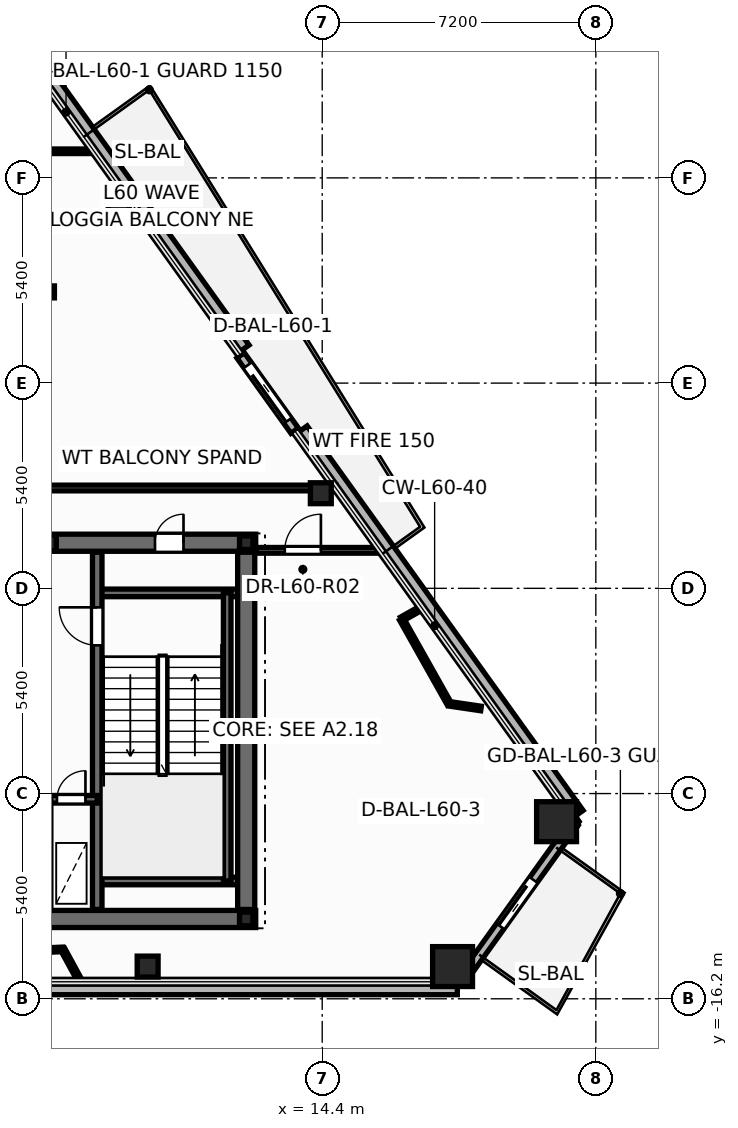
"""IFC4 building model, lengths in metres.
Left out: names, types, materials, properties, quantities, classifications, styles, units other than length and angle.
Written with IfcOpenShell. Run it as: python <this file> out.ifc"""

import sys

from ifc_helpers import new_model, si_unit, direction, frame, frame_2d, origin, origin_2d, place, context, subcontext, project, spatial, rectangle, hollow_rectangle, hollow_circle, i_section, extrude, element, fill, save


model = new_model("IFC4")
c1 = context("Model", 3, precision=1e-05, world=origin(), true_north=direction((0.0, 1.0)))
c2 = subcontext(c1, "Body", "Model", "MODEL_VIEW")
j1 = project(units=[si_unit("LENGTHUNIT", "METRE"), si_unit("PLANEANGLEUNIT", "RADIAN")], contexts=[c1])
p1 = place(None, origin())
s1 = spatial("IfcSite", under=j1, at=p1, CompositionType="ELEMENT")
p2 = place(p1, origin())
s2 = spatial("IfcBuilding", under=s1, at=p2, CompositionType="ELEMENT")
p3 = place(p2, frame((0.0, 0.0, 228.9)))
s3 = spatial("IfcBuildingStorey", under=s2, at=p3, CompositionType="ELEMENT", Elevation=228.9)
for number, where, z_axis, x_axis in (
    (1, (17.83, -15.352, 0.0), (0.0, 0.0, 1.0), (1.0, 0.0, 0.0)),
    (2, (20.567, -11.54, 0.0), (0.0, 0.0, 1.0), (1.0, 0.0, 0.0)),
):
    element("IfcColumn", number, at=place(p3, frame(where, z_axis=z_axis, x_axis=x_axis)), inside=s3, PredefinedType="COLUMN", context=c2, shape_type="SweptSolid", body=[
        extrude(hollow_rectangle(XDim=1.05, YDim=1.05, WallThickness=0.045, at=origin_2d()), origin(), (0.0, 0.0, 1.0), 4.5),
    ])
for number, where, z_axis, x_axis in (
    (3, (9.807, -15.352, 0.0), (0.0, 0.0, 1.0), (1.0, 0.0, 0.0)),
    (4, (14.363, -2.897, 0.0), (0.0, 0.0, 1.0), (1.0, 0.0, 0.0)),
    (5, (9.046, 4.51, 0.0), (0.0, 0.0, 1.0), (1.0, 0.0, 0.0)),
):
    element("IfcColumn", number, at=place(p3, frame(where, z_axis=z_axis, x_axis=x_axis)), inside=s3, PredefinedType="COLUMN", context=c2, shape_type="SweptSolid", body=[
        extrude(hollow_circle(Radius=0.275, WallThickness=0.024, at=origin_2d()), origin(), (0.0, 0.0, 1.0), 4.5),
    ])
for number, where, z_axis, x_axis in (
    (6, (12.4, -14.1, 0.0), (0.0, 0.0, 1.0), (1.0, 0.0, 0.0)),
    (7, (12.4, -4.2, 0.0), (0.0, 0.0, 1.0), (1.0, 0.0, 0.0)),
):
    element("IfcColumn", number, at=place(p3, frame(where, z_axis=z_axis, x_axis=x_axis)), inside=s3, PredefinedType="COLUMN", context=c2, shape_type="SweptSolid", body=[
        extrude(i_section(OverallWidth=0.352, OverallDepth=0.359, WebThickness=0.018, FlangeThickness=0.026, at=origin_2d()), origin(), (0.0, 0.0, 1.0), 4.5),
    ])
p4 = place(p3, frame((7.2, -4.2, 0.0), z_axis=(0.0, 0.0, 1.0), x_axis=(1.0, 0.0, 0.0)))
e8 = element("IfcColumn", 8, at=p4, inside=s3, PredefinedType="PILASTER", context=c2, shape_type="SweptSolid", body=[
    extrude(i_section(OverallWidth=0.405, OverallDepth=0.414, WebThickness=0.022, FlangeThickness=0.032, at=origin_2d()), origin(), (0.0, 0.0, 1.0), 4.5),
])
p5 = place(p3, frame((7.2, 2.4, 0.0), z_axis=(0.0, 0.0, 1.0), x_axis=(1.0, 0.0, 0.0)))
e9 = element("IfcColumn", 9, at=p5, inside=s3, PredefinedType="COLUMN", context=c2, shape_type="SweptSolid", body=[
    extrude(i_section(OverallWidth=0.307, OverallDepth=0.314, WebThickness=0.012, FlangeThickness=0.019, at=origin_2d()), origin(), (0.0, 0.0, 1.0), 4.5),
])
p6 = place(p3, frame((-17.955, -15.912, -0.2), z_axis=(0.0, 0.0, 1.0), x_axis=(1.0, 0.0, 0.0)))
e10 = element("IfcWall", 10, at=p6, inside=s3, PredefinedType="PARAPET", context=c2, shape_type="SweptSolid", body=[
    extrude(rectangle(XDim=35.911, YDim=0.36, at=frame_2d((17.955, 0.0))), origin(), (0.0, 0.0, 1.0), 0.38),
])
p7 = place(p3, frame((21.119, -11.349, -0.2), z_axis=(0.0, 0.0, 1.0), x_axis=(-0.583115229509, 0.81238945655, 0.0)))
e11 = element("IfcWall", 11, at=p7, inside=s3, PredefinedType="PARAPET", context=c2, shape_type="SweptSolid", body=[
    extrude(rectangle(XDim=12.453, YDim=0.36, at=frame_2d((6.227, 0.0))), origin(), (0.0, 0.0, 1.0), 0.38),
])
p8 = place(p3, frame((12.33, 0.896, -0.2), z_axis=(0.0, 0.0, 1.0), x_axis=(-0.583103601817, 0.812397802526, 0.0)))
e12 = element("IfcWall", 12, at=p8, inside=s3, PredefinedType="PARAPET", context=c2, shape_type="SweptSolid", body=[
    extrude(rectangle(XDim=15.574, YDim=0.36, at=frame_2d((7.787, 0.0))), origin(), (0.0, 0.0, 1.0), 0.38),
])
p9 = place(p3, frame((13.675, -1.252, -0.015), z_axis=(0.0, 0.0, 1.0), x_axis=(-0.583139062732, 0.812372349059, 0.0)))
e13 = element("IfcWall", 13, at=p9, inside=s3, PredefinedType="STANDARD", context=c2, shape_type="SweptSolid", body=[
    extrude(rectangle(XDim=2.44, YDim=0.24, at=frame_2d((1.22, 0.0))), origin(), (0.0, 0.0, 1.0), 3.778),
])
p10 = place(p9, frame((0.32, 0.0, 0.015)))
e14 = element("IfcOpeningElement", 14, at=p10, cuts=e13, PredefinedType="OPENING", context=c2, shape_type="SweptSolid", body=[
    extrude(rectangle(XDim=1.806, YDim=2.204, at=frame_2d((0.9, 1.102))), frame((0.0, 0.13, 0.0), z_axis=(0.0, -1.0, 0.0), x_axis=(1.0, 0.0, 0.0)), (0.0, 0.0, 1.0), 0.26),
])
p11 = place(p3, frame((18.059, -15.72, -0.015), z_axis=(0.0, 0.0, 1.0), x_axis=(0.583136392473, 0.812374265824, 0.0)))
e15 = element("IfcWall", 15, at=p11, inside=s3, PredefinedType="STANDARD", context=c2, shape_type="SweptSolid", body=[
    extrude(rectangle(XDim=5.106, YDim=0.24, at=frame_2d((2.553, 0.0))), origin(), (0.0, 0.0, 1.0), 3.778),
])
p12 = place(p11, frame((1.759, 0.0, 0.015)))
e16 = element("IfcOpeningElement", 16, at=p12, cuts=e15, PredefinedType="OPENING", context=c2, shape_type="SweptSolid", body=[
    extrude(rectangle(XDim=1.506, YDim=2.204, at=frame_2d((0.75, 1.102))), frame((0.0, 0.13, 0.0), z_axis=(0.0, -1.0, 0.0), x_axis=(1.0, 0.0, 0.0)), (0.0, 0.0, 1.0), 0.26),
])
p13 = place(p3, frame((-12.65, -14.1, 0.0), z_axis=(0.0, 0.0, 1.0), x_axis=(1.0, 0.0, 0.0)))
e17 = element("IfcWall", 17, at=p13, inside=s3, PredefinedType="SHEAR", context=c2, shape_type="SweptSolid", body=[
    extrude(rectangle(XDim=25.3, YDim=0.45, at=frame_2d((12.65, 0.0))), origin(), (0.0, 0.0, 1.0), 4.5),
])
p14 = place(p3, frame((-12.65, -4.2, 0.0), z_axis=(0.0, 0.0, 1.0), x_axis=(1.0, 0.0, 0.0)))
e18 = element("IfcWall", 18, at=p14, inside=s3, PredefinedType="SHEAR", context=c2, shape_type="SweptSolid", body=[
    extrude(rectangle(XDim=25.3, YDim=0.45, at=frame_2d((12.65, 0.0))), origin(), (0.0, 0.0, 1.0), 4.5),
])
p15 = place(p14, frame((1.85, 0.0, 0.0)))
e19 = element("IfcOpeningElement", 19, at=p15, cuts=e18, PredefinedType="OPENING", context=c2, shape_type="SweptSolid", body=[
    extrude(rectangle(XDim=0.756, YDim=2.054, at=frame_2d((0.375, 1.027))), frame((0.0, 0.235, 0.0), z_axis=(0.0, -1.0, 0.0), x_axis=(1.0, 0.0, 0.0)), (0.0, 0.0, 1.0), 0.47),
])
p16 = place(p14, frame((22.65, 0.0, 0.0)))
e20 = element("IfcOpeningElement", 20, at=p16, cuts=e18, PredefinedType="OPENING", context=c2, shape_type="SweptSolid", body=[
    extrude(rectangle(XDim=0.756, YDim=2.054, at=frame_2d((0.375, 1.027))), frame((0.0, 0.235, 0.0), z_axis=(0.0, -1.0, 0.0), x_axis=(1.0, 0.0, 0.0)), (0.0, 0.0, 1.0), 0.47),
])
p17 = place(p14, frame((5.85, 0.0, 0.0)))
e21 = element("IfcOpeningElement", 21, at=p17, cuts=e18, PredefinedType="OPENING", context=c2, shape_type="SweptSolid", body=[
    extrude(rectangle(XDim=1.006, YDim=2.104, at=frame_2d((0.5, 1.052))), frame((0.0, 0.235, 0.0), z_axis=(0.0, -1.0, 0.0), x_axis=(1.0, 0.0, 0.0)), (0.0, 0.0, 1.0), 0.47),
])
p18 = place(p14, frame((10.35, 0.0, 0.0)))
e22 = element("IfcOpeningElement", 22, at=p18, cuts=e18, PredefinedType="OPENING", context=c2, shape_type="SweptSolid", body=[
    extrude(rectangle(XDim=1.406, YDim=2.154, at=frame_2d((0.7, 1.077))), frame((0.0, 0.235, 0.0), z_axis=(0.0, -1.0, 0.0), x_axis=(1.0, 0.0, 0.0)), (0.0, 0.0, 1.0), 0.47),
])
p19 = place(p14, frame((18.45, 0.0, 0.0)))
e23 = element("IfcOpeningElement", 23, at=p19, cuts=e18, PredefinedType="OPENING", context=c2, shape_type="SweptSolid", body=[
    extrude(rectangle(XDim=1.006, YDim=2.104, at=frame_2d((0.5, 1.052))), frame((0.0, 0.235, 0.0), z_axis=(0.0, -1.0, 0.0), x_axis=(1.0, 0.0, 0.0)), (0.0, 0.0, 1.0), 0.47),
])
for number, where, z_axis, x_axis in (
    (24, (8.48, -5.52, 0.0), (0.0, 0.0, 1.0), (1.0, 0.0, 0.0)),
    (25, (8.48, -13.1, 0.0), (0.0, 0.0, 1.0), (1.0, 0.0, 0.0)),
):
    element("IfcWall", number, at=place(p3, frame(where, z_axis=z_axis, x_axis=x_axis)), inside=s3, PredefinedType="SOLIDWALL", context=c2, shape_type="SweptSolid", body=[
        extrude(rectangle(XDim=3.87, YDim=0.2, at=frame_2d((1.935, 0.0))), origin(), (0.0, 0.0, 1.0), 4.5),
    ])
p20 = place(p3, frame((11.9, -13.1, 0.0), z_axis=(0.0, 0.0, 1.0), x_axis=(0.0, 1.0, 0.0)))
e26 = element("IfcWall", 26, at=p20, inside=s3, PredefinedType="SOLIDWALL", context=c2, shape_type="SweptSolid", body=[
    extrude(rectangle(XDim=7.58, YDim=0.2, at=frame_2d((3.79, 0.0))), origin(), (0.0, 0.0, 1.0), 4.5),
])
p21 = place(p3, frame((8.48, -13.85, 0.0), z_axis=(0.0, 0.0, 1.0), x_axis=(0.0, 1.0, 0.0)))
e27 = element("IfcWall", 27, at=p21, inside=s3, PredefinedType="SHEAR", context=c2, shape_type="SweptSolid", body=[
    extrude(rectangle(XDim=9.4, YDim=0.25, at=frame_2d((4.7, 0.0))), origin(), (0.0, 0.0, 1.0), 4.5),
])
p22 = place(p21, frame((6.95, 0.0, 0.0)))
e28 = element("IfcOpeningElement", 28, at=p22, cuts=e27, PredefinedType="OPENING", context=c2, shape_type="SweptSolid", body=[
    extrude(rectangle(XDim=1.006, YDim=2.104, at=frame_2d((0.5, 1.052))), frame((0.0, 0.135, 0.0), z_axis=(0.0, -1.0, 0.0), x_axis=(1.0, 0.0, 0.0)), (0.0, 0.0, 1.0), 0.27),
])
p23 = place(p3, frame((5.12, -10.95, 0.0), z_axis=(0.0, 0.0, 1.0), x_axis=(1.0, 0.0, 0.0)))
e29 = element("IfcWall", 29, at=p23, inside=s3, PredefinedType="SOLIDWALL", context=c2, shape_type="SweptSolid", body=[
    extrude(rectangle(XDim=3.36, YDim=0.2, at=frame_2d((1.68, 0.0))), origin(), (0.0, 0.0, 1.0), 4.5),
])
p24 = place(p23, frame((0.42, 0.0, 0.0)))
e30 = element("IfcOpeningElement", 30, at=p24, cuts=e29, PredefinedType="OPENING", context=c2, shape_type="SweptSolid", body=[
    extrude(rectangle(XDim=1.106, YDim=2.104, at=frame_2d((0.55, 1.052))), frame((0.0, 0.11, 0.0), z_axis=(0.0, -1.0, 0.0), x_axis=(1.0, 0.0, 0.0)), (0.0, 0.0, 1.0), 0.22),
])
p25 = place(p23, frame((2.3, 0.0, 0.0)))
e31 = element("IfcOpeningElement", 31, at=p25, cuts=e29, PredefinedType="OPENING", context=c2, shape_type="SweptSolid", body=[
    extrude(rectangle(XDim=0.756, YDim=2.054, at=frame_2d((0.375, 1.027))), frame((0.0, 0.11, 0.0), z_axis=(0.0, -1.0, 0.0), x_axis=(1.0, 0.0, 0.0)), (0.0, 0.0, 1.0), 0.22),
])
p26 = place(p3, frame((12.4, -13.85, 0.0), z_axis=(0.0, 0.0, 1.0), x_axis=(0.0, 1.0, 0.0)))
e32 = element("IfcWall", 32, at=p26, inside=s3, PredefinedType="SHEAR", context=c2, shape_type="SweptSolid", body=[
    extrude(rectangle(XDim=9.4, YDim=0.45, at=frame_2d((4.7, 0.0))), origin(), (0.0, 0.0, 1.0), 4.5),
])
p27 = place(p3, frame((2.08, -2.76, 0.0), z_axis=(0.0, 0.0, 1.0), x_axis=(1.0, 0.0, 0.0)))
e33 = element("IfcWall", 33, at=p27, inside=s3, PredefinedType="PARTITIONING", context=c2, shape_type="SweptSolid", body=[
    extrude(rectangle(XDim=12.677, YDim=0.15, at=frame_2d((6.339, 0.0))), origin(), (0.0, 0.0, 1.0), 3.22),
])
p28 = place(p27, frame((0.44, 0.0, 0.0)))
e34 = element("IfcOpeningElement", 34, at=p28, cuts=e33, PredefinedType="OPENING", context=c2, shape_type="SweptSolid", body=[
    extrude(rectangle(XDim=0.956, YDim=2.104, at=frame_2d((0.475, 1.052))), frame((0.0, 0.085, 0.0), z_axis=(0.0, -1.0, 0.0), x_axis=(1.0, 0.0, 0.0)), (0.0, 0.0, 1.0), 0.17),
])
p29 = place(p3, frame((-0.66, 6.1, 0.0), z_axis=(0.0, 0.0, 1.0), x_axis=(1.0, 0.0, 0.0)))
e35 = element("IfcWall", 35, at=p29, inside=s3, PredefinedType="PARTITIONING", context=c2, shape_type="SweptSolid", body=[
    extrude(rectangle(XDim=9.058, YDim=0.12, at=frame_2d((4.529, 0.0))), origin(), (0.0, 0.0, 1.0), 3.22),
])
p30 = place(p3, frame((3.115, -15.102, 0.0), z_axis=(0.0, 0.0, 1.0), x_axis=(0.998971020326, 0.04535306549, 0.0)))
e36 = element("IfcWall", 36, at=p30, inside=s3, PredefinedType="PARTITIONING", context=c2, shape_type="SweptSolid", body=[
    extrude(rectangle(XDim=4.463, YDim=0.12, at=frame_2d((2.231, 0.0))), origin(), (0.0, 0.0, 1.0), 4.245),
])
p31 = place(p3, frame((12.652, -4.4, 0.0), z_axis=(0.0, 0.0, 1.0), x_axis=(1.0, 0.0, 0.0)))
e37 = element("IfcWall", 37, at=p31, inside=s3, PredefinedType="PARTITIONING", context=c2, shape_type="SweptSolid", body=[
    extrude(rectangle(XDim=3.282, YDim=0.15, at=frame_2d((1.641, 0.0))), origin(), (0.0, 0.0, 1.0), 3.22),
])
p32 = place(p31, frame((0.763, 0.0, 0.0)))
e38 = element("IfcOpeningElement", 38, at=p32, cuts=e37, PredefinedType="OPENING", context=c2, shape_type="SweptSolid", body=[
    extrude(rectangle(XDim=0.956, YDim=2.104, at=frame_2d((0.475, 1.052))), frame((0.0, 0.085, 0.0), z_axis=(0.0, -1.0, 0.0), x_axis=(1.0, 0.0, 0.0)), (0.0, 0.0, 1.0), 0.17),
])
p33 = place(p3, frame((17.742, -8.439, 0.0), z_axis=(0.0, 0.0, 1.0), x_axis=(-0.490329227995, 0.87153729018, 0.0)))
e39 = element("IfcWall", 39, at=p33, inside=s3, PredefinedType="PARTITIONING", context=c2, shape_type="SweptSolid", body=[
    extrude(rectangle(XDim=2.557, YDim=0.12, at=frame_2d((1.279, 0.0))), origin(), (0.0, 0.0, 1.0), 4.245),
])
p34 = place(p3, frame((18.579, -8.562, 0.0), z_axis=(0.0, 0.0, 1.0), x_axis=(-0.989322448528, 0.145743242855, 0.0)))
e40 = element("IfcWall", 40, at=p34, inside=s3, PredefinedType="PARTITIONING", context=c2, shape_type="SweptSolid", body=[
    extrude(rectangle(XDim=0.846, YDim=0.12, at=frame_2d((0.423, 0.0))), origin(), (0.0, 0.0, 1.0), 3.763),
])
p35 = place(p3, frame((7.573, -14.899, 0.0), z_axis=(0.0, 0.0, 1.0), x_axis=(0.478546739668, -0.878062080922, 0.0)))
e41 = element("IfcWall", 41, at=p35, inside=s3, PredefinedType="PARTITIONING", context=c2, shape_type="SweptSolid", body=[
    extrude(rectangle(XDim=0.84, YDim=0.12, at=frame_2d((0.42, 0.0))), origin(), (0.0, 0.0, 1.0), 3.763),
])
p36 = place(p3, frame((16.488, -6.21, 0.0), z_axis=(0.0, 0.0, 1.0), x_axis=(0.871532028392, 0.49033858046, 0.0)))
e42 = element("IfcWall", 42, at=p36, inside=s3, PredefinedType="PARTITIONING", context=c2, shape_type="SweptSolid", body=[
    extrude(rectangle(XDim=0.599, YDim=0.12, at=frame_2d((0.3, 0.0))), origin(), (0.0, 0.0, 1.0), 3.763),
])
p37 = place(p10, origin())
e43 = element("IfcDoor", 43, at=p37, inside=s3, OperationType="SLIDING_TO_LEFT", PredefinedType="DOOR", context=c2, shape_type="SweptSolid", body=[
    extrude(rectangle(XDim=1.8, YDim=2.2, at=frame_2d((0.9, 1.1))), frame((0.0, 0.025, 0.0), z_axis=(0.0, -1.0, 0.0), x_axis=(1.0, 0.0, 0.0)), (0.0, 0.0, 1.0), 0.05),
])
fill(e14, e43)
p38 = place(p12, origin())
e44 = element("IfcDoor", 44, at=p38, inside=s3, OperationType="SLIDING_TO_RIGHT", PredefinedType="DOOR", context=c2, shape_type="SweptSolid", body=[
    extrude(rectangle(XDim=1.5, YDim=2.2, at=frame_2d((0.75, 1.1))), frame((0.0, 0.025, 0.0), z_axis=(0.0, -1.0, 0.0), x_axis=(1.0, 0.0, 0.0)), (0.0, 0.0, 1.0), 0.05),
])
fill(e16, e44)
p39 = place(p22, origin())
e45 = element("IfcDoor", 45, at=p39, inside=s3, OperationType="SINGLE_SWING_RIGHT", PredefinedType="DOOR", context=c2, shape_type="SweptSolid", body=[
    extrude(rectangle(XDim=1.0, YDim=2.1, at=frame_2d((0.5, 1.05))), frame((0.0, 0.025, 0.0), z_axis=(0.0, -1.0, 0.0), x_axis=(1.0, 0.0, 0.0)), (0.0, 0.0, 1.0), 0.05),
])
fill(e28, e45)
p40 = place(p25, origin())
e46 = element("IfcDoor", 46, at=p40, inside=s3, OperationType="SINGLE_SWING_RIGHT", PredefinedType="DOOR", context=c2, shape_type="SweptSolid", body=[
    extrude(rectangle(XDim=0.75, YDim=2.05, at=frame_2d((0.375, 1.025))), frame((0.0, 0.025, 0.0), z_axis=(0.0, -1.0, 0.0), x_axis=(1.0, 0.0, 0.0)), (0.0, 0.0, 1.0), 0.05),
])
fill(e31, e46)
p41 = place(p16, origin())
e47 = element("IfcDoor", 47, at=p41, inside=s3, OperationType="SINGLE_SWING_RIGHT", PredefinedType="DOOR", context=c2, shape_type="SweptSolid", body=[
    extrude(rectangle(XDim=0.75, YDim=2.05, at=frame_2d((0.375, 1.025))), frame((0.0, 0.025, 0.0), z_axis=(0.0, -1.0, 0.0), x_axis=(1.0, 0.0, 0.0)), (0.0, 0.0, 1.0), 0.05),
])
fill(e20, e47)
p42 = place(p32, origin())
e48 = element("IfcDoor", 48, at=p42, inside=s3, OperationType="SINGLE_SWING_RIGHT", PredefinedType="DOOR", context=c2, shape_type="SweptSolid", body=[
    extrude(rectangle(XDim=0.95, YDim=2.1, at=frame_2d((0.475, 1.05))), frame((0.0, 0.025, 0.0), z_axis=(0.0, -1.0, 0.0), x_axis=(1.0, 0.0, 0.0)), (0.0, 0.0, 1.0), 0.05),
])
fill(e38, e48)
save(model, sys.argv[1])
